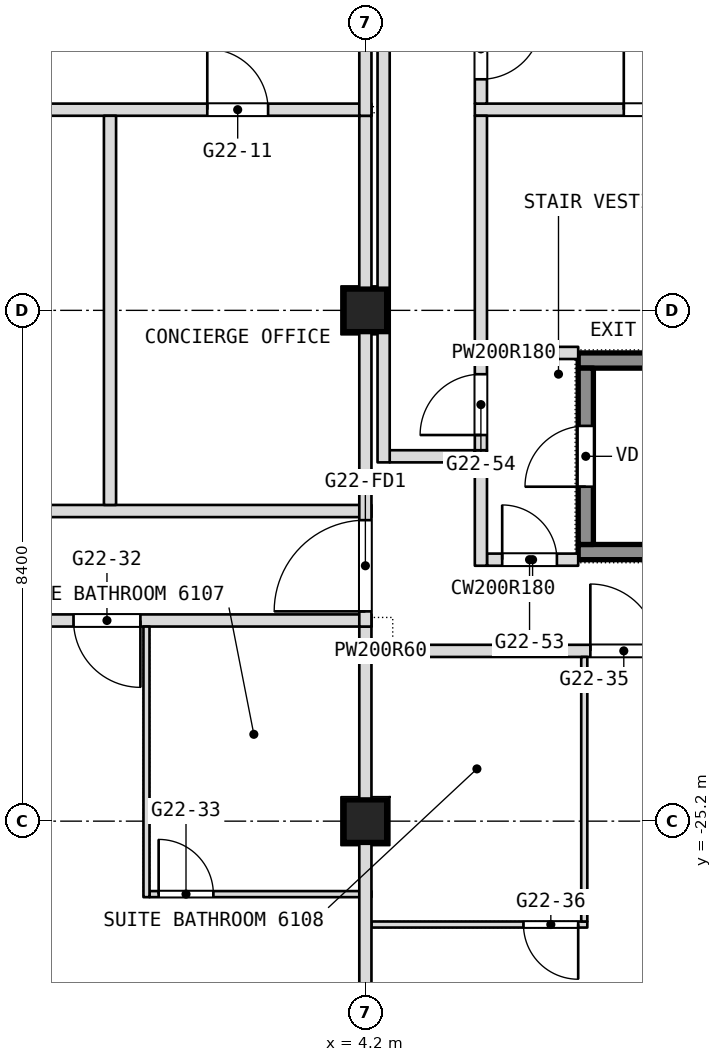
"""IFC4 building model, lengths in metres.
Left out: names, types, materials, properties, quantities, classifications, styles, units other than length and angle.
Written with IfcOpenShell. Run it as: python <this file> out.ifc"""

import sys

from ifc_helpers import new_model, si_unit, direction, frame, frame_2d, origin, origin_2d, place, context, subcontext, project, spatial, rectangle, extrude, element, fill, save


model = new_model("IFC4")
c1 = context("Model", 3, precision=1e-05, world=origin(), true_north=direction((0.0, 1.0)))
c2 = subcontext(c1, "Body", "Model", "MODEL_VIEW")
j1 = project(units=[si_unit("LENGTHUNIT", "METRE"), si_unit("PLANEANGLEUNIT", "RADIAN")], contexts=[c1])
p1 = place(None, origin())
s1 = spatial("IfcSite", under=j1, at=p1, CompositionType="ELEMENT")
p2 = place(p1, origin())
s2 = spatial("IfcBuilding", under=s1, at=p2, CompositionType="ELEMENT")
p3 = place(p2, frame((0.0, 0.0, 266.9)))
s3 = spatial("IfcBuildingStorey", under=s2, at=p3, CompositionType="ELEMENT", Elevation=266.9)
for number, where, z_axis, x_axis in (
    (1, (4.2, -25.2, 0.0), (0.0, 0.0, 1.0), (1.0, 0.0, 0.0)),
    (2, (4.2, -16.8, 0.0), (0.0, 0.0, 1.0), (1.0, 0.0, 0.0)),
):
    element("IfcColumn", number, at=place(p3, frame(where, z_axis=z_axis, x_axis=x_axis)), inside=s3, PredefinedType="COLUMN", context=c2, shape_type="SweptSolid", body=[
        extrude(rectangle(XDim=0.7, YDim=0.7, at=origin_2d()), origin(), (0.0, 0.0, 1.0), 3.6),
    ])
p4 = place(p3, frame((4.3, -26.9, 0.0), z_axis=(0.0, 0.0, 1.0), x_axis=(1.0, 0.0, 0.0)))
e3 = element("IfcWall", 3, at=p4, inside=s3, PredefinedType="PARTITIONING", context=c2, shape_type="SweptSolid", body=[
    extrude(rectangle(XDim=3.55, YDim=0.1, at=frame_2d((1.775, 0.0))), origin(), (0.0, 0.0, 1.0), 3.34),
])
p5 = place(p4, frame((2.5, 0.0, 0.0)))
e4 = element("IfcOpeningElement", 4, at=p5, cuts=e3, PredefinedType="OPENING", context=c2, shape_type="SweptSolid", body=[
    extrude(rectangle(XDim=0.9, YDim=2.1, at=frame_2d((0.45, 1.05))), frame((0.0, 0.05, 0.0), z_axis=(0.0, -1.0, 0.0), x_axis=(1.0, 0.0, 0.0)), (0.0, 0.0, 1.0), 0.1),
])
p6 = place(p3, frame((0.65, -26.4, 0.0), z_axis=(0.0, 0.0, 1.0), x_axis=(1.0, 0.0, 0.0)))
e5 = element("IfcWall", 5, at=p6, inside=s3, PredefinedType="PARTITIONING", context=c2, shape_type="SweptSolid", body=[
    extrude(rectangle(XDim=3.65, YDim=0.1, at=frame_2d((1.825, 0.0))), origin(), (0.0, 0.0, 1.0), 3.34),
])
p7 = place(p6, frame((0.15, 0.0, 0.0)))
e6 = element("IfcOpeningElement", 6, at=p7, cuts=e5, PredefinedType="OPENING", context=c2, shape_type="SweptSolid", body=[
    extrude(rectangle(XDim=0.9, YDim=2.1, at=frame_2d((0.45, 1.05))), frame((0.0, 0.05, 0.0), z_axis=(0.0, -1.0, 0.0), x_axis=(1.0, 0.0, 0.0)), (0.0, 0.0, 1.0), 0.1),
])
p8 = place(p3, frame((4.3, -22.4, 0.0), z_axis=(0.0, 0.0, 1.0), x_axis=(1.0, 0.0, 0.0)))
e7 = element("IfcWall", 7, at=p8, inside=s3, PredefinedType="PARTITIONING", context=c2, shape_type="SweptSolid", body=[
    extrude(rectangle(XDim=0.3, YDim=0.2, at=frame_2d((0.15, 0.0))), origin(), (0.0, 0.0, 1.0), 3.34),
])
p9 = place(p3, frame((4.6, -22.4, 0.0), z_axis=(0.0, 0.0, 1.0), x_axis=(1.0, 0.0, 0.0)))
e8 = element("IfcWall", 8, at=p9, inside=s3, PredefinedType="PARTITIONING", context=c2, shape_type="SweptSolid", body=[
    extrude(rectangle(XDim=10.7, YDim=0.2, at=frame_2d((5.35, 0.0))), origin(), (0.0, 0.0, 1.0), 3.34),
])
p10 = place(p9, frame((3.3, 0.0, 0.0)))
e9 = element("IfcOpeningElement", 9, at=p10, cuts=e8, PredefinedType="OPENING", context=c2, shape_type="SweptSolid", body=[
    extrude(rectangle(XDim=1.1, YDim=2.1, at=frame_2d((0.55, 1.05))), frame((0.0, 0.1, 0.0), z_axis=(0.0, -1.0, 0.0), x_axis=(1.0, 0.0, 0.0)), (0.0, 0.0, 1.0), 0.2),
])
p11 = place(p9, frame((9.55, 0.0, 0.0)))
e10 = element("IfcOpeningElement", 10, at=p11, cuts=e8, PredefinedType="OPENING", context=c2, shape_type="SweptSolid", body=[
    extrude(rectangle(XDim=1.0, YDim=2.1, at=frame_2d((0.5, 1.05))), frame((0.0, 0.1, 0.0), z_axis=(0.0, -1.0, 0.0), x_axis=(1.0, 0.0, 0.0)), (0.0, 0.0, 1.0), 0.2),
])
p12 = place(p3, frame((-16.7, -21.9, 0.0), z_axis=(0.0, 0.0, 1.0), x_axis=(1.0, 0.0, 0.0)))
e11 = element("IfcWall", 11, at=p12, inside=s3, PredefinedType="PARTITIONING", context=c2, shape_type="SweptSolid", body=[
    extrude(rectangle(XDim=21.0, YDim=0.2, at=frame_2d((10.5, 0.0))), origin(), (0.0, 0.0, 1.0), 3.34),
])
p13 = place(p12, frame((1.5, 0.0, 0.0)))
e12 = element("IfcOpeningElement", 12, at=p13, cuts=e11, PredefinedType="OPENING", context=c2, shape_type="SweptSolid", body=[
    extrude(rectangle(XDim=1.0, YDim=2.1, at=frame_2d((0.5, 1.05))), frame((0.0, 0.1, 0.0), z_axis=(0.0, -1.0, 0.0), x_axis=(1.0, 0.0, 0.0)), (0.0, 0.0, 1.0), 0.2),
])
p14 = place(p12, frame((9.85, 0.0, 0.0)))
e13 = element("IfcOpeningElement", 13, at=p14, cuts=e11, PredefinedType="OPENING", context=c2, shape_type="SweptSolid", body=[
    extrude(rectangle(XDim=1.1, YDim=2.1, at=frame_2d((0.55, 1.05))), frame((0.0, 0.1, 0.0), z_axis=(0.0, -1.0, 0.0), x_axis=(1.0, 0.0, 0.0)), (0.0, 0.0, 1.0), 0.2),
])
p15 = place(p12, frame((16.1, 0.0, 0.0)))
e14 = element("IfcOpeningElement", 14, at=p15, cuts=e11, PredefinedType="OPENING", context=c2, shape_type="SweptSolid", body=[
    extrude(rectangle(XDim=1.1, YDim=2.1, at=frame_2d((0.55, 1.05))), frame((0.0, 0.1, 0.0), z_axis=(0.0, -1.0, 0.0), x_axis=(1.0, 0.0, 0.0)), (0.0, 0.0, 1.0), 0.2),
])
p16 = place(p3, frame((6.2, -20.9, 0.0), z_axis=(0.0, 0.0, 1.0), x_axis=(1.0, 0.0, 0.0)))
e15 = element("IfcWall", 15, at=p16, inside=s3, PredefinedType="PARTITIONING", context=c2, shape_type="SweptSolid", body=[
    extrude(rectangle(XDim=1.5, YDim=0.2, at=frame_2d((0.75, 0.0))), origin(), (0.0, 0.0, 1.0), 3.34),
])
p17 = place(p16, frame((0.25, 0.0, 0.0)))
e16 = element("IfcOpeningElement", 16, at=p17, cuts=e15, PredefinedType="OPENING", context=c2, shape_type="SweptSolid", body=[
    extrude(rectangle(XDim=0.9, YDim=2.1, at=frame_2d((0.45, 1.05))), frame((0.0, 0.1, 0.0), z_axis=(0.0, -1.0, 0.0), x_axis=(1.0, 0.0, 0.0)), (0.0, 0.0, 1.0), 0.2),
])
p18 = place(p3, frame((-16.7, -20.1, 0.0), z_axis=(0.0, 0.0, 1.0), x_axis=(1.0, 0.0, 0.0)))
e17 = element("IfcWall", 17, at=p18, inside=s3, PredefinedType="PARTITIONING", context=c2, shape_type="SweptSolid", body=[
    extrude(rectangle(XDim=21.0, YDim=0.2, at=frame_2d((10.5, 0.0))), origin(), (0.0, 0.0, 1.0), 3.34),
])
p19 = place(p18, frame((5.7, 0.0, 0.0)))
e18 = element("IfcOpeningElement", 18, at=p19, cuts=e17, PredefinedType="OPENING", context=c2, shape_type="SweptSolid", body=[
    extrude(rectangle(XDim=1.0, YDim=2.1, at=frame_2d((0.5, 1.05))), frame((0.0, 0.1, 0.0), z_axis=(0.0, -1.0, 0.0), x_axis=(1.0, 0.0, 0.0)), (0.0, 0.0, 1.0), 0.2),
])
p20 = place(p3, frame((4.6, -19.2, 0.0), z_axis=(0.0, 0.0, 1.0), x_axis=(1.0, 0.0, 0.0)))
e19 = element("IfcWall", 19, at=p20, inside=s3, PredefinedType="PARTITIONING", context=c2, shape_type="SweptSolid", body=[
    extrude(rectangle(XDim=1.4, YDim=0.2, at=frame_2d((0.7, 0.0))), origin(), (0.0, 0.0, 1.0), 3.34),
])
p21 = place(p3, frame((6.0, -17.5, 0.0), z_axis=(0.0, 0.0, 1.0), x_axis=(1.0, 0.0, 0.0)))
e20 = element("IfcWall", 20, at=p21, inside=s3, PredefinedType="PARTITIONING", context=c2, shape_type="SweptSolid", body=[
    extrude(rectangle(XDim=1.7, YDim=0.2, at=frame_2d((0.85, 0.0))), origin(), (0.0, 0.0, 1.0), 3.34),
])
p22 = place(p3, frame((-8.4, -13.5, 0.0), z_axis=(0.0, 0.0, 1.0), x_axis=(1.0, 0.0, 0.0)))
e21 = element("IfcWall", 21, at=p22, inside=s3, PredefinedType="PARTITIONING", context=c2, shape_type="SweptSolid", body=[
    extrude(rectangle(XDim=12.7, YDim=0.2, at=frame_2d((6.35, 0.0))), origin(), (0.0, 0.0, 1.0), 3.34),
])
p23 = place(p22, frame((1.6, 0.0, 0.0)))
e22 = element("IfcOpeningElement", 22, at=p23, cuts=e21, PredefinedType="OPENING", context=c2, shape_type="SweptSolid", body=[
    extrude(rectangle(XDim=1.0, YDim=2.1, at=frame_2d((0.5, 1.05))), frame((0.0, 0.1, 0.0), z_axis=(0.0, -1.0, 0.0), x_axis=(1.0, 0.0, 0.0)), (0.0, 0.0, 1.0), 0.2),
])
p24 = place(p22, frame((5.8, 0.0, 0.0)))
e23 = element("IfcOpeningElement", 23, at=p24, cuts=e21, PredefinedType="OPENING", context=c2, shape_type="SweptSolid", body=[
    extrude(rectangle(XDim=1.0, YDim=2.1, at=frame_2d((0.5, 1.05))), frame((0.0, 0.1, 0.0), z_axis=(0.0, -1.0, 0.0), x_axis=(1.0, 0.0, 0.0)), (0.0, 0.0, 1.0), 0.2),
])
p25 = place(p22, frame((10.0, 0.0, 0.0)))
e24 = element("IfcOpeningElement", 24, at=p25, cuts=e21, PredefinedType="OPENING", context=c2, shape_type="SweptSolid", body=[
    extrude(rectangle(XDim=1.0, YDim=2.1, at=frame_2d((0.5, 1.05))), frame((0.0, 0.1, 0.0), z_axis=(0.0, -1.0, 0.0), x_axis=(1.0, 0.0, 0.0)), (0.0, 0.0, 1.0), 0.2),
])
p26 = place(p3, frame((6.0, -13.5, 0.0), z_axis=(0.0, 0.0, 1.0), x_axis=(1.0, 0.0, 0.0)))
e25 = element("IfcWall", 25, at=p26, inside=s3, PredefinedType="PARTITIONING", context=c2, shape_type="SweptSolid", body=[
    extrude(rectangle(XDim=10.7, YDim=0.2, at=frame_2d((5.35, 0.0))), origin(), (0.0, 0.0, 1.0), 3.34),
])
p27 = place(p26, frame((2.45, 0.0, 0.0)))
e26 = element("IfcOpeningElement", 26, at=p27, cuts=e25, PredefinedType="OPENING", context=c2, shape_type="SweptSolid", body=[
    extrude(rectangle(XDim=1.8, YDim=2.1, at=frame_2d((0.9, 1.05))), frame((0.0, 0.1, 0.0), z_axis=(0.0, -1.0, 0.0), x_axis=(1.0, 0.0, 0.0)), (0.0, 0.0, 1.0), 0.2),
])
p28 = place(p26, frame((8.2, 0.0, 0.0)))
e27 = element("IfcOpeningElement", 27, at=p28, cuts=e25, PredefinedType="OPENING", context=c2, shape_type="SweptSolid", body=[
    extrude(rectangle(XDim=1.0, YDim=2.1, at=frame_2d((0.5, 1.05))), frame((0.0, 0.1, 0.0), z_axis=(0.0, -1.0, 0.0), x_axis=(1.0, 0.0, 0.0)), (0.0, 0.0, 1.0), 0.2),
])
p29 = place(p3, frame((7.8, -26.85, 0.0), z_axis=(0.0, 0.0, 1.0), x_axis=(0.0, 1.0, 0.0)))
e28 = element("IfcWall", 28, at=p29, inside=s3, PredefinedType="PARTITIONING", context=c2, shape_type="SweptSolid", body=[
    extrude(rectangle(XDim=4.35, YDim=0.1, at=frame_2d((2.175, 0.0))), origin(), (0.0, 0.0, 1.0), 3.34),
])
p30 = place(p3, frame((6.1, -21.0, 0.0), z_axis=(0.0, 0.0, 1.0), x_axis=(0.0, 1.0, 0.0)))
e29 = element("IfcWall", 29, at=p30, inside=s3, PredefinedType="PARTITIONING", context=c2, shape_type="SweptSolid", body=[
    extrude(rectangle(XDim=1.9, YDim=0.2, at=frame_2d((0.95, 0.0))), origin(), (0.0, 0.0, 1.0), 3.34),
])
p31 = place(p3, frame((6.1, -13.4, 0.0), z_axis=(0.0, 0.0, 1.0), x_axis=(0.0, 1.0, 0.0)))
e30 = element("IfcWall", 30, at=p31, inside=s3, PredefinedType="PARTITIONING", context=c2, shape_type="SweptSolid", body=[
    extrude(rectangle(XDim=1.8, YDim=0.2, at=frame_2d((0.9, 0.0))), origin(), (0.0, 0.0, 1.0), 3.34),
])
p32 = place(p31, frame((0.4, 0.0, 0.0)))
e31 = element("IfcOpeningElement", 31, at=p32, cuts=e30, PredefinedType="OPENING", context=c2, shape_type="SweptSolid", body=[
    extrude(rectangle(XDim=1.0, YDim=2.1, at=frame_2d((0.5, 1.05))), frame((0.0, 0.1, 0.0), z_axis=(0.0, -1.0, 0.0), x_axis=(1.0, 0.0, 0.0)), (0.0, 0.0, 1.0), 0.2),
])
p33 = place(p3, frame((6.1, -19.1, 0.0), z_axis=(0.0, 0.0, 1.0), x_axis=(0.0, 1.0, 0.0)))
e32 = element("IfcWall", 32, at=p33, inside=s3, PredefinedType="PARTITIONING", context=c2, shape_type="SweptSolid", body=[
    extrude(rectangle(XDim=5.5, YDim=0.2, at=frame_2d((2.75, 0.0))), origin(), (0.0, 0.0, 1.0), 3.34),
])
p34 = place(p33, frame((0.25, 0.0, 0.0)))
e33 = element("IfcOpeningElement", 33, at=p34, cuts=e32, PredefinedType="OPENING", context=c2, shape_type="SweptSolid", body=[
    extrude(rectangle(XDim=1.0, YDim=2.1, at=frame_2d((0.5, 1.05))), frame((0.0, 0.1, 0.0), z_axis=(0.0, -1.0, 0.0), x_axis=(1.0, 0.0, 0.0)), (0.0, 0.0, 1.0), 0.2),
])
p35 = place(p3, frame((4.5, -19.3, 0.0), z_axis=(0.0, 0.0, 1.0), x_axis=(0.0, 1.0, 0.0)))
e34 = element("IfcWall", 34, at=p35, inside=s3, PredefinedType="PARTITIONING", context=c2, shape_type="SweptSolid", body=[
    extrude(rectangle(XDim=19.2, YDim=0.2, at=frame_2d((9.6, 0.0))), origin(), (0.0, 0.0, 1.0), 3.34),
])
p36 = place(p35, frame((17.6, 0.0, 0.0)))
e35 = element("IfcOpeningElement", 35, at=p36, cuts=e34, PredefinedType="OPENING", context=c2, shape_type="SweptSolid", body=[
    extrude(rectangle(XDim=1.0, YDim=2.1, at=frame_2d((0.5, 1.05))), frame((0.0, 0.1, 0.0), z_axis=(0.0, -1.0, 0.0), x_axis=(1.0, 0.0, 0.0)), (0.0, 0.0, 1.0), 0.2),
])
p37 = place(p3, frame((4.2, -34.5, 0.0), z_axis=(0.0, 0.0, 1.0), x_axis=(0.0, 1.0, 0.0)))
e36 = element("IfcWall", 36, at=p37, inside=s3, PredefinedType="PARTITIONING", context=c2, shape_type="SweptSolid", body=[
    extrude(rectangle(XDim=12.2, YDim=0.2, at=frame_2d((6.1, 0.0))), origin(), (0.0, 0.0, 1.0), 3.34),
])
p38 = place(p3, frame((4.2, -22.5, 0.0), z_axis=(0.0, 0.0, 1.0), x_axis=(0.0, 1.0, 0.0)))
e37 = element("IfcWall", 37, at=p38, inside=s3, PredefinedType="PARTITIONING", context=c2, shape_type="SweptSolid", body=[
    extrude(rectangle(XDim=0.5, YDim=0.2, at=frame_2d((0.25, 0.0))), origin(), (0.0, 0.0, 1.0), 3.34),
])
p39 = place(p3, frame((4.2, -22.0, 0.0), z_axis=(0.0, 0.0, 1.0), x_axis=(0.0, 1.0, 0.0)))
e38 = element("IfcWall", 38, at=p39, inside=s3, PredefinedType="PARTITIONING", context=c2, shape_type="SweptSolid", body=[
    extrude(rectangle(XDim=8.4, YDim=0.2, at=frame_2d((4.2, 0.0))), origin(), (0.0, 0.0, 1.0), 3.34),
])
p40 = place(p39, frame((0.25, 0.0, 0.0)))
e39 = element("IfcOpeningElement", 39, at=p40, cuts=e38, PredefinedType="OPENING", context=c2, shape_type="SweptSolid", body=[
    extrude(rectangle(XDim=1.5, YDim=2.1, at=frame_2d((0.75, 1.05))), frame((0.0, 0.1, 0.0), z_axis=(0.0, -1.0, 0.0), x_axis=(1.0, 0.0, 0.0)), (0.0, 0.0, 1.0), 0.2),
])
p41 = place(p3, frame((4.2, -13.6, 0.0), z_axis=(0.0, 0.0, 1.0), x_axis=(0.0, 1.0, 0.0)))
e40 = element("IfcWall", 40, at=p41, inside=s3, PredefinedType="PARTITIONING", context=c2, shape_type="SweptSolid", body=[
    extrude(rectangle(XDim=11.9, YDim=0.2, at=frame_2d((5.95, 0.0))), origin(), (0.0, 0.0, 1.0), 3.34),
])
p42 = place(p3, frame((0.6, -26.45, 0.0), z_axis=(0.0, 0.0, 1.0), x_axis=(0.0, 1.0, 0.0)))
e41 = element("IfcWall", 41, at=p42, inside=s3, PredefinedType="PARTITIONING", context=c2, shape_type="SweptSolid", body=[
    extrude(rectangle(XDim=4.45, YDim=0.1, at=frame_2d((2.225, 0.0))), origin(), (0.0, 0.0, 1.0), 3.34),
])
p43 = place(p3, frame((0.0, -20.0, 0.0), z_axis=(0.0, 0.0, 1.0), x_axis=(0.0, 1.0, 0.0)))
e42 = element("IfcWall", 42, at=p43, inside=s3, PredefinedType="PARTITIONING", context=c2, shape_type="SweptSolid", body=[
    extrude(rectangle(XDim=6.4, YDim=0.2, at=frame_2d((3.2, 0.0))), origin(), (0.0, 0.0, 1.0), 3.34),
])
for number, where, z_axis, x_axis in (
    (43, (7.7, -20.775, -0.26), (0.0, 0.0, 1.0), (1.0, 0.0, 0.0)),
    (44, (7.7, -17.625, -0.26), (0.0, 0.0, 1.0), (1.0, 0.0, 0.0)),
):
    element("IfcWall", number, at=place(p3, frame(where, z_axis=z_axis, x_axis=x_axis)), inside=s3, PredefinedType="SHEAR", context=c2, shape_type="SweptSolid", body=[
        extrude(rectangle(XDim=6.2, YDim=0.25, at=frame_2d((3.1, 0.0))), origin(), (0.0, 0.0, 1.0), 3.96),
    ])
p44 = place(p3, frame((7.825, -20.65, -0.26), z_axis=(0.0, 0.0, 1.0), x_axis=(0.0, 1.0, 0.0)))
e45 = element("IfcWall", 45, at=p44, inside=s3, PredefinedType="SHEAR", context=c2, shape_type="SweptSolid", body=[
    extrude(rectangle(XDim=2.9, YDim=0.25, at=frame_2d((1.45, 0.0))), origin(), (0.0, 0.0, 1.0), 3.96),
])
p45 = place(p44, frame((0.95, 0.0, 0.0)))
e46 = element("IfcOpeningElement", 46, at=p45, cuts=e45, PredefinedType="OPENING", context=c2, shape_type="SweptSolid", body=[
    extrude(rectangle(XDim=1.0, YDim=2.1, at=frame_2d((0.5, 1.05))), frame((0.0, 0.125, 0.0), z_axis=(0.0, -1.0, 0.0), x_axis=(1.0, 0.0, 0.0)), (0.0, 0.0, 1.0), 0.25),
])
p46 = place(p5, origin())
e47 = element("IfcDoor", 47, at=p46, inside=s3, OperationType="SINGLE_SWING_RIGHT", PredefinedType="DOOR", context=c2, shape_type="SweptSolid", body=[
    extrude(rectangle(XDim=0.9, YDim=2.1, at=frame_2d((0.45, 1.05))), frame((0.0, 0.025, 0.0), z_axis=(0.0, -1.0, 0.0), x_axis=(1.0, 0.0, 0.0)), (0.0, 0.0, 1.0), 0.05),
])
fill(e4, e47)
p47 = place(p7, origin())
e48 = element("IfcDoor", 48, at=p47, inside=s3, OperationType="SINGLE_SWING_LEFT", PredefinedType="DOOR", context=c2, shape_type="SweptSolid", body=[
    extrude(rectangle(XDim=0.9, YDim=2.1, at=frame_2d((0.45, 1.05))), frame((0.0, 0.025, 0.0), z_axis=(0.0, -1.0, 0.0), x_axis=(1.0, 0.0, 0.0)), (0.0, 0.0, 1.0), 0.05),
])
fill(e6, e48)
p48 = place(p10, origin())
e49 = element("IfcDoor", 49, at=p48, inside=s3, OperationType="SINGLE_SWING_RIGHT", PredefinedType="DOOR", context=c2, shape_type="SweptSolid", body=[
    extrude(rectangle(XDim=1.1, YDim=2.1, at=frame_2d((0.55, 1.05))), frame((0.0, 0.025, 0.0), z_axis=(0.0, -1.0, 0.0), x_axis=(1.0, 0.0, 0.0)), (0.0, 0.0, 1.0), 0.05),
])
fill(e9, e49)
p49 = place(p15, origin())
e50 = element("IfcDoor", 50, at=p49, inside=s3, OperationType="SINGLE_SWING_LEFT", PredefinedType="DOOR", context=c2, shape_type="SweptSolid", body=[
    extrude(rectangle(XDim=1.1, YDim=2.1, at=frame_2d((0.55, 1.05))), frame((0.0, 0.025, 0.0), z_axis=(0.0, -1.0, 0.0), x_axis=(1.0, 0.0, 0.0)), (0.0, 0.0, 1.0), 0.05),
])
fill(e14, e50)
p50 = place(p17, origin())
e51 = element("IfcDoor", 51, at=p50, inside=s3, OperationType="SINGLE_SWING_LEFT", PredefinedType="DOOR", context=c2, shape_type="SweptSolid", body=[
    extrude(rectangle(XDim=0.9, YDim=2.1, at=frame_2d((0.45, 1.05))), frame((0.0, 0.025, 0.0), z_axis=(0.0, -1.0, 0.0), x_axis=(1.0, 0.0, 0.0)), (0.0, 0.0, 1.0), 0.05),
])
fill(e16, e51)
p51 = place(p25, origin())
e52 = element("IfcDoor", 52, at=p51, inside=s3, OperationType="SINGLE_SWING_RIGHT", PredefinedType="DOOR", context=c2, shape_type="SweptSolid", body=[
    extrude(rectangle(XDim=1.0, YDim=2.1, at=frame_2d((0.5, 1.05))), frame((0.0, 0.025, 0.0), z_axis=(0.0, -1.0, 0.0), x_axis=(1.0, 0.0, 0.0)), (0.0, 0.0, 1.0), 0.05),
])
fill(e24, e52)
p52 = place(p27, origin())
e53 = element("IfcDoor", 53, at=p52, inside=s3, OperationType="DOUBLE_DOOR_SINGLE_SWING", PredefinedType="DOOR", context=c2, shape_type="SweptSolid", body=[
    extrude(rectangle(XDim=1.8, YDim=2.1, at=frame_2d((0.9, 1.05))), frame((0.0, 0.025, 0.0), z_axis=(0.0, -1.0, 0.0), x_axis=(1.0, 0.0, 0.0)), (0.0, 0.0, 1.0), 0.05),
])
fill(e26, e53)
p53 = place(p32, origin())
e54 = element("IfcDoor", 54, at=p53, inside=s3, OperationType="SINGLE_SWING_RIGHT", PredefinedType="DOOR", context=c2, shape_type="SweptSolid", body=[
    extrude(rectangle(XDim=1.0, YDim=2.1, at=frame_2d((0.5, 1.05))), frame((0.0, 0.025, 0.0), z_axis=(0.0, -1.0, 0.0), x_axis=(1.0, 0.0, 0.0)), (0.0, 0.0, 1.0), 0.05),
])
fill(e31, e54)
p54 = place(p34, origin())
e55 = element("IfcDoor", 55, at=p54, inside=s3, OperationType="SINGLE_SWING_LEFT", PredefinedType="DOOR", context=c2, shape_type="SweptSolid", body=[
    extrude(rectangle(XDim=1.0, YDim=2.1, at=frame_2d((0.5, 1.05))), frame((0.0, 0.025, 0.0), z_axis=(0.0, -1.0, 0.0), x_axis=(1.0, 0.0, 0.0)), (0.0, 0.0, 1.0), 0.05),
])
fill(e33, e55)
p55 = place(p45, origin())
e56 = element("IfcDoor", 56, at=p55, inside=s3, OperationType="SINGLE_SWING_LEFT", PredefinedType="DOOR", context=c2, shape_type="SweptSolid", body=[
    extrude(rectangle(XDim=1.0, YDim=2.1, at=frame_2d((0.5, 1.05))), frame((0.0, 0.025, 0.0), z_axis=(0.0, -1.0, 0.0), x_axis=(1.0, 0.0, 0.0)), (0.0, 0.0, 1.0), 0.05),
])
fill(e46, e56)
p56 = place(p40, origin())
e57 = element("IfcDoor", 57, at=p56, inside=s3, OperationType="DOUBLE_DOOR_DOUBLE_SWING", PredefinedType="DOOR", context=c2, shape_type="SweptSolid", body=[
    extrude(rectangle(XDim=1.5, YDim=2.1, at=frame_2d((0.75, 1.05))), frame((0.0, 0.025, 0.0), z_axis=(0.0, -1.0, 0.0), x_axis=(1.0, 0.0, 0.0)), (0.0, 0.0, 1.0), 0.05),
])
fill(e39, e57)
save(model, sys.argv[1])
